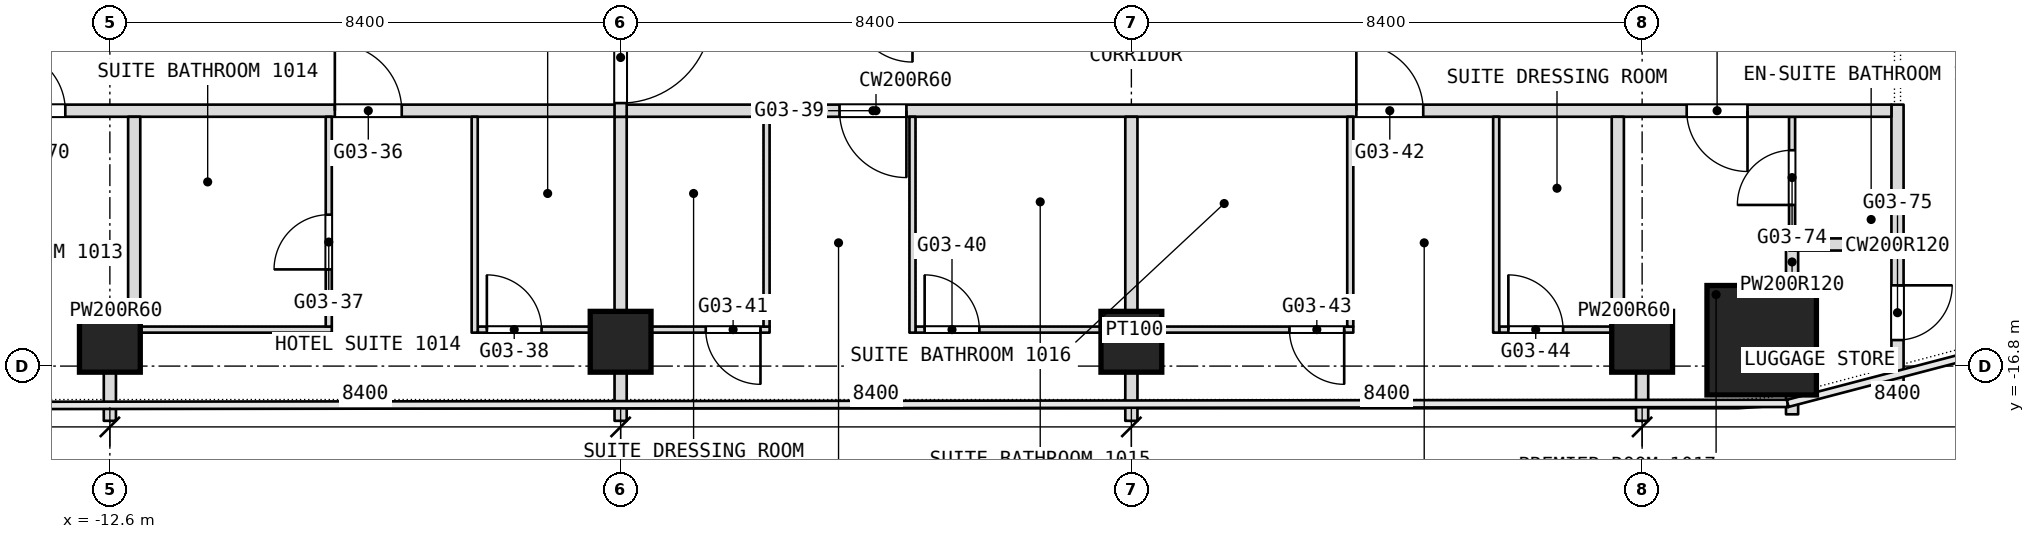
"""IFC4 building model, lengths in metres.
Left out: names, types, materials, properties, quantities, classifications, styles, units other than length and angle.
Written with IfcOpenShell. Run it as: python <this file> out.ifc"""

import sys

from ifc_helpers import new_model, si_unit, direction, frame, frame_2d, origin, origin_2d, place, context, subcontext, project, spatial, rectangle, extrude, element, fill, save


model = new_model("IFC4")
c1 = context("Model", 3, precision=1e-05, world=origin(), true_north=direction((0.0, 1.0)))
c2 = subcontext(c1, "Body", "Model", "MODEL_VIEW")
j1 = project(units=[si_unit("LENGTHUNIT", "METRE"), si_unit("PLANEANGLEUNIT", "RADIAN")], contexts=[c1])
p1 = place(None, origin())
s1 = spatial("IfcSite", under=j1, at=p1, CompositionType="ELEMENT")
p2 = place(p1, origin())
s2 = spatial("IfcBuilding", under=s1, at=p2, CompositionType="ELEMENT")
p3 = place(p2, frame((0.0, 0.0, 50.9)))
s3 = spatial("IfcBuildingStorey", under=s2, at=p3, CompositionType="ELEMENT", Elevation=50.9)
p4 = place(p3, frame((14.566, -16.375, 0.0), z_axis=(0.0, 0.0, 1.0), x_axis=(1.0, 0.0, 0.0)))
e1 = element("IfcColumn", 1, at=p4, inside=s3, PredefinedType="COLUMN", context=c2, shape_type="SweptSolid", body=[
    extrude(rectangle(XDim=1.8, YDim=1.8, at=origin_2d()), origin(), (0.0, 0.0, 1.0), 3.6),
])
for number, where, z_axis, x_axis in (
    (2, (12.6, -16.4, 0.0), (0.0, 0.0, 1.0), (1.0, 0.0, 0.0)),
    (3, (4.2, -16.4, 0.0), (0.0, 0.0, 1.0), (1.0, 0.0, 0.0)),
    (4, (-4.2, -16.4, 0.0), (0.0, 0.0, 1.0), (1.0, 0.0, 0.0)),
    (5, (-12.6, -16.4, 0.0), (0.0, 0.0, 1.0), (1.0, 0.0, 0.0)),
):
    element("IfcColumn", number, at=place(p3, frame(where, z_axis=z_axis, x_axis=x_axis)), inside=s3, PredefinedType="COLUMN", context=c2, shape_type="SweptSolid", body=[
        extrude(rectangle(XDim=1.0, YDim=1.0, at=origin_2d()), origin(), (0.0, 0.0, 1.0), 3.6),
    ])
p5 = place(p3, frame((16.8, -17.143, 0.0), z_axis=(0.0, 0.0, 1.0), x_axis=(0.0, 1.0, 0.0)))
e6 = element("IfcWall", 6, at=p5, inside=s3, PredefinedType="PARTITIONING", context=c2, shape_type="SweptSolid", body=[
    extrude(rectangle(XDim=4.643, YDim=0.2, at=frame_2d((2.322, 0.0))), origin(), (0.0, 0.0, 1.0), 3.34),
])
p6 = place(p5, frame((0.771, 0.0, 0.0)))
e7 = element("IfcOpeningElement", 7, at=p6, cuts=e6, PredefinedType="OPENING", context=c2, shape_type="SweptSolid", body=[
    extrude(rectangle(XDim=0.9, YDim=2.1, at=frame_2d((0.45, 1.05))), frame((0.0, 0.1, 0.0), z_axis=(0.0, -1.0, 0.0), x_axis=(1.0, 0.0, 0.0)), (0.0, 0.0, 1.0), 0.2),
])
p7 = place(p3, frame((-12.5, -16.2, 0.0), z_axis=(0.0, 0.0, 1.0), x_axis=(1.0, 0.0, 0.0)))
e8 = element("IfcWall", 8, at=p7, inside=s3, PredefinedType="PARTITIONING", context=c2, shape_type="SweptSolid", body=[
    extrude(rectangle(XDim=3.55, YDim=0.1, at=frame_2d((1.775, 0.0))), origin(), (0.0, 0.0, 1.0), 2.94),
])
p8 = place(p3, frame((-6.55, -16.2, 0.0), z_axis=(0.0, 0.0, 1.0), x_axis=(1.0, 0.0, 0.0)))
e9 = element("IfcWall", 9, at=p8, inside=s3, PredefinedType="PARTITIONING", context=c2, shape_type="SweptSolid", body=[
    extrude(rectangle(XDim=4.8, YDim=0.1, at=frame_2d((2.4, 0.0))), origin(), (0.0, 0.0, 1.0), 2.94),
])
p9 = place(p8, frame((0.15, 0.0, 0.0)))
e10 = element("IfcOpeningElement", 10, at=p9, cuts=e9, PredefinedType="OPENING", context=c2, shape_type="SweptSolid", body=[
    extrude(rectangle(XDim=0.9, YDim=2.1, at=frame_2d((0.45, 1.05))), frame((0.0, 0.05, 0.0), z_axis=(0.0, -1.0, 0.0), x_axis=(1.0, 0.0, 0.0)), (0.0, 0.0, 1.0), 0.1),
])
p10 = place(p8, frame((3.75, 0.0, 0.0)))
e11 = element("IfcOpeningElement", 11, at=p10, cuts=e9, PredefinedType="OPENING", context=c2, shape_type="SweptSolid", body=[
    extrude(rectangle(XDim=0.9, YDim=2.1, at=frame_2d((0.45, 1.05))), frame((0.0, 0.05, 0.0), z_axis=(0.0, -1.0, 0.0), x_axis=(1.0, 0.0, 0.0)), (0.0, 0.0, 1.0), 0.1),
])
p11 = place(p3, frame((0.65, -16.2, 0.0), z_axis=(0.0, 0.0, 1.0), x_axis=(1.0, 0.0, 0.0)))
e12 = element("IfcWall", 12, at=p11, inside=s3, PredefinedType="PARTITIONING", context=c2, shape_type="SweptSolid", body=[
    extrude(rectangle(XDim=7.2, YDim=0.1, at=frame_2d((3.6, 0.0))), origin(), (0.0, 0.0, 1.0), 2.94),
])
p12 = place(p11, frame((0.15, 0.0, 0.0)))
e13 = element("IfcOpeningElement", 13, at=p12, cuts=e12, PredefinedType="OPENING", context=c2, shape_type="SweptSolid", body=[
    extrude(rectangle(XDim=0.9, YDim=2.1, at=frame_2d((0.45, 1.05))), frame((0.0, 0.05, 0.0), z_axis=(0.0, -1.0, 0.0), x_axis=(1.0, 0.0, 0.0)), (0.0, 0.0, 1.0), 0.1),
])
p13 = place(p11, frame((6.15, 0.0, 0.0)))
e14 = element("IfcOpeningElement", 14, at=p13, cuts=e12, PredefinedType="OPENING", context=c2, shape_type="SweptSolid", body=[
    extrude(rectangle(XDim=0.9, YDim=2.1, at=frame_2d((0.45, 1.05))), frame((0.0, 0.05, 0.0), z_axis=(0.0, -1.0, 0.0), x_axis=(1.0, 0.0, 0.0)), (0.0, 0.0, 1.0), 0.1),
])
p14 = place(p3, frame((10.25, -16.2, 0.0), z_axis=(0.0, 0.0, 1.0), x_axis=(1.0, 0.0, 0.0)))
e15 = element("IfcWall", 15, at=p14, inside=s3, PredefinedType="PARTITIONING", context=c2, shape_type="SweptSolid", body=[
    extrude(rectangle(XDim=2.45, YDim=0.1, at=frame_2d((1.225, 0.0))), origin(), (0.0, 0.0, 1.0), 3.34),
])
p15 = place(p14, frame((0.15, 0.0, 0.0)))
e16 = element("IfcOpeningElement", 16, at=p15, cuts=e15, PredefinedType="OPENING", context=c2, shape_type="SweptSolid", body=[
    extrude(rectangle(XDim=0.9, YDim=2.1, at=frame_2d((0.45, 1.05))), frame((0.0, 0.05, 0.0), z_axis=(0.0, -1.0, 0.0), x_axis=(1.0, 0.0, 0.0)), (0.0, 0.0, 1.0), 0.1),
])
for number, where, z_axis, x_axis in (
    (17, (-12.7, -15.9, 0.0), (0.0, 0.0, 1.0), (1.0, 0.0, 0.0)),
    (18, (12.1, -15.9, 0.0), (0.0, 0.0, 1.0), (1.0, 0.0, 0.0)),
):
    element("IfcWall", number, at=place(p3, frame(where, z_axis=z_axis, x_axis=x_axis)), inside=s3, PredefinedType="PARTITIONING", context=c2, shape_type="SweptSolid", body=[
        extrude(rectangle(XDim=0.4, YDim=0.2, at=frame_2d((0.2, 0.0))), origin(), (0.0, 0.0, 1.0), 3.34),
    ])
p16 = place(p3, frame((15.066, -17.593, 0.0), z_axis=(0.0, 0.0, 1.0), x_axis=(0.0, 1.0, 0.0)))
e19 = element("IfcWall", 19, at=p16, inside=s3, PredefinedType="PARTITIONING", context=c2, shape_type="SweptSolid", body=[
    extrude(rectangle(XDim=0.318, YDim=0.2, at=frame_2d((0.159, 0.0))), origin(), (0.0, 0.0, 1.0), 3.34),
])
p17 = place(p3, frame((15.066, -15.475, 0.0), z_axis=(0.0, 0.0, 1.0), x_axis=(0.0, 1.0, 0.0)))
e20 = element("IfcWall", 20, at=p17, inside=s3, PredefinedType="PARTITIONING", context=c2, shape_type="SweptSolid", body=[
    extrude(rectangle(XDim=0.775, YDim=0.2, at=frame_2d((0.388, 0.0))), origin(), (0.0, 0.0, 1.0), 3.34),
])
p18 = place(p3, frame((15.066, -14.9, 0.0), z_axis=(0.0, 0.0, 1.0), x_axis=(0.0, 1.0, 0.0)))
e21 = element("IfcWall", 21, at=p18, inside=s3, PredefinedType="PARTITIONING", context=c2, shape_type="SweptSolid", body=[
    extrude(rectangle(XDim=2.2, YDim=0.1, at=frame_2d((1.1, 0.0))), origin(), (0.0, 0.0, 1.0), 3.34),
])
p19 = place(p18, frame((0.75, 0.0, 0.0)))
e22 = element("IfcOpeningElement", 22, at=p19, cuts=e21, PredefinedType="OPENING", context=c2, shape_type="SweptSolid", body=[
    extrude(rectangle(XDim=0.9, YDim=2.1, at=frame_2d((0.45, 1.05))), frame((0.0, 0.05, 0.0), z_axis=(0.0, -1.0, 0.0), x_axis=(1.0, 0.0, 0.0)), (0.0, 0.0, 1.0), 0.1),
])
p20 = place(p3, frame((15.116, -14.8, 0.0), z_axis=(0.0, 0.0, 1.0), x_axis=(1.0, 0.0, 0.0)))
e23 = element("IfcWall", 23, at=p20, inside=s3, PredefinedType="PARTITIONING", context=c2, shape_type="SweptSolid", body=[
    extrude(rectangle(XDim=1.584, YDim=0.2, at=frame_2d((0.792, 0.0))), origin(), (0.0, 0.0, 1.0), 3.34),
])
p21 = place(p3, frame((12.6, -17.7, 0.0), z_axis=(0.0, 0.0, 1.0), x_axis=(0.0, 1.0, 0.0)))
e24 = element("IfcWall", 24, at=p21, inside=s3, PredefinedType="PARTITIONING", context=c2, shape_type="SweptSolid", body=[
    extrude(rectangle(XDim=1.9, YDim=0.2, at=frame_2d((0.95, 0.0))), origin(), (0.0, 0.0, 1.0), 3.34),
])
p22 = place(p3, frame((-16.7, -12.6, 0.0), z_axis=(0.0, 0.0, 1.0), x_axis=(1.0, 0.0, 0.0)))
e25 = element("IfcWall", 25, at=p22, inside=s3, PredefinedType="PARTITIONING", context=c2, shape_type="SweptSolid", body=[
    extrude(rectangle(XDim=33.4, YDim=0.2, at=frame_2d((16.7, 0.0))), origin(), (0.0, 0.0, 1.0), 3.34),
])
p23 = place(p22, frame((7.8, 0.0, 0.0)))
e26 = element("IfcOpeningElement", 26, at=p23, cuts=e25, PredefinedType="OPENING", context=c2, shape_type="SweptSolid", body=[
    extrude(rectangle(XDim=1.1, YDim=2.1, at=frame_2d((0.55, 1.05))), frame((0.0, 0.1, 0.0), z_axis=(0.0, -1.0, 0.0), x_axis=(1.0, 0.0, 0.0)), (0.0, 0.0, 1.0), 0.2),
])
p24 = place(p22, frame((16.1, 0.0, 0.0)))
e27 = element("IfcOpeningElement", 27, at=p24, cuts=e25, PredefinedType="OPENING", context=c2, shape_type="SweptSolid", body=[
    extrude(rectangle(XDim=1.1, YDim=2.1, at=frame_2d((0.55, 1.05))), frame((0.0, 0.1, 0.0), z_axis=(0.0, -1.0, 0.0), x_axis=(1.0, 0.0, 0.0)), (0.0, 0.0, 1.0), 0.2),
])
p25 = place(p22, frame((24.6, 0.0, 0.0)))
e28 = element("IfcOpeningElement", 28, at=p25, cuts=e25, PredefinedType="OPENING", context=c2, shape_type="SweptSolid", body=[
    extrude(rectangle(XDim=1.1, YDim=2.1, at=frame_2d((0.55, 1.05))), frame((0.0, 0.1, 0.0), z_axis=(0.0, -1.0, 0.0), x_axis=(1.0, 0.0, 0.0)), (0.0, 0.0, 1.0), 0.2),
])
p26 = place(p22, frame((2.367, 0.0, 0.0)))
e29 = element("IfcOpeningElement", 29, at=p26, cuts=e25, PredefinedType="OPENING", context=c2, shape_type="SweptSolid", body=[
    extrude(rectangle(XDim=1.0, YDim=2.1, at=frame_2d((0.5, 1.05))), frame((0.0, 0.1, 0.0), z_axis=(0.0, -1.0, 0.0), x_axis=(1.0, 0.0, 0.0)), (0.0, 0.0, 1.0), 0.2),
])
p27 = place(p22, frame((30.033, 0.0, 0.0)))
e30 = element("IfcOpeningElement", 30, at=p27, cuts=e25, PredefinedType="OPENING", context=c2, shape_type="SweptSolid", body=[
    extrude(rectangle(XDim=1.0, YDim=2.1, at=frame_2d((0.5, 1.05))), frame((0.0, 0.1, 0.0), z_axis=(0.0, -1.0, 0.0), x_axis=(1.0, 0.0, 0.0)), (0.0, 0.0, 1.0), 0.2),
])
p28 = place(p3, frame((12.2, -15.8, 0.0), z_axis=(0.0, 0.0, 1.0), x_axis=(0.0, 1.0, 0.0)))
e31 = element("IfcWall", 31, at=p28, inside=s3, PredefinedType="PARTITIONING", context=c2, shape_type="SweptSolid", body=[
    extrude(rectangle(XDim=3.1, YDim=0.2, at=frame_2d((1.55, 0.0))), origin(), (0.0, 0.0, 1.0), 3.34),
])
p29 = place(p3, frame((10.2, -16.25, 0.0), z_axis=(0.0, 0.0, 1.0), x_axis=(0.0, 1.0, 0.0)))
e32 = element("IfcWall", 32, at=p29, inside=s3, PredefinedType="PARTITIONING", context=c2, shape_type="SweptSolid", body=[
    extrude(rectangle(XDim=3.55, YDim=0.1, at=frame_2d((1.775, 0.0))), origin(), (0.0, 0.0, 1.0), 3.34),
])
p30 = place(p3, frame((7.8, -16.15, 0.0), z_axis=(0.0, 0.0, 1.0), x_axis=(0.0, 1.0, 0.0)))
e33 = element("IfcWall", 33, at=p30, inside=s3, PredefinedType="PARTITIONING", context=c2, shape_type="SweptSolid", body=[
    extrude(rectangle(XDim=3.45, YDim=0.1, at=frame_2d((1.725, 0.0))), origin(), (0.0, 0.0, 1.0), 3.34),
])
p31 = place(p3, frame((4.2, -17.7, 0.0), z_axis=(0.0, 0.0, 1.0), x_axis=(0.0, 1.0, 0.0)))
e34 = element("IfcWall", 34, at=p31, inside=s3, PredefinedType="PARTITIONING", context=c2, shape_type="SweptSolid", body=[
    extrude(rectangle(XDim=5.0, YDim=0.2, at=frame_2d((2.5, 0.0))), origin(), (0.0, 0.0, 1.0), 3.34),
])
p32 = place(p3, frame((0.6, -16.25, 0.0), z_axis=(0.0, 0.0, 1.0), x_axis=(0.0, 1.0, 0.0)))
e35 = element("IfcWall", 35, at=p32, inside=s3, PredefinedType="PARTITIONING", context=c2, shape_type="SweptSolid", body=[
    extrude(rectangle(XDim=3.55, YDim=0.1, at=frame_2d((1.775, 0.0))), origin(), (0.0, 0.0, 1.0), 3.34),
])
p33 = place(p3, frame((-1.8, -16.15, 0.0), z_axis=(0.0, 0.0, 1.0), x_axis=(0.0, 1.0, 0.0)))
e36 = element("IfcWall", 36, at=p33, inside=s3, PredefinedType="PARTITIONING", context=c2, shape_type="SweptSolid", body=[
    extrude(rectangle(XDim=3.45, YDim=0.1, at=frame_2d((1.725, 0.0))), origin(), (0.0, 0.0, 1.0), 3.34),
])
p34 = place(p3, frame((-4.2, -17.7, 0.0), z_axis=(0.0, 0.0, 1.0), x_axis=(0.0, 1.0, 0.0)))
e37 = element("IfcWall", 37, at=p34, inside=s3, PredefinedType="PARTITIONING", context=c2, shape_type="SweptSolid", body=[
    extrude(rectangle(XDim=5.0, YDim=0.2, at=frame_2d((2.5, 0.0))), origin(), (0.0, 0.0, 1.0), 3.34),
])
p35 = place(p3, frame((-4.2, -12.7, 0.0), z_axis=(0.0, 0.0, 1.0), x_axis=(0.0, 1.0, 0.0)))
e38 = element("IfcWall", 38, at=p35, inside=s3, PredefinedType="PARTITIONING", context=c2, shape_type="SweptSolid", body=[
    extrude(rectangle(XDim=12.7, YDim=0.2, at=frame_2d((6.35, 0.0))), origin(), (0.0, 0.0, 1.0), 3.34),
])
p36 = place(p35, frame((11.05, 0.0, 0.0)))
e39 = element("IfcOpeningElement", 39, at=p36, cuts=e38, PredefinedType="OPENING", context=c2, shape_type="SweptSolid", body=[
    extrude(rectangle(XDim=1.5, YDim=2.1, at=frame_2d((0.75, 1.05))), frame((0.0, 0.1, 0.0), z_axis=(0.0, -1.0, 0.0), x_axis=(1.0, 0.0, 0.0)), (0.0, 0.0, 1.0), 0.2),
])
p37 = place(p35, frame((0.225, 0.0, 0.0)))
e40 = element("IfcOpeningElement", 40, at=p37, cuts=e38, PredefinedType="OPENING", context=c2, shape_type="SweptSolid", body=[
    extrude(rectangle(XDim=1.5, YDim=2.1, at=frame_2d((0.75, 1.05))), frame((0.0, 0.1, 0.0), z_axis=(0.0, -1.0, 0.0), x_axis=(1.0, 0.0, 0.0)), (0.0, 0.0, 1.0), 0.2),
])
p38 = place(p3, frame((-6.6, -16.25, 0.0), z_axis=(0.0, 0.0, 1.0), x_axis=(0.0, 1.0, 0.0)))
e41 = element("IfcWall", 41, at=p38, inside=s3, PredefinedType="PARTITIONING", context=c2, shape_type="SweptSolid", body=[
    extrude(rectangle(XDim=3.55, YDim=0.1, at=frame_2d((1.775, 0.0))), origin(), (0.0, 0.0, 1.0), 3.34),
])
p39 = place(p3, frame((-9.0, -16.15, 0.0), z_axis=(0.0, 0.0, 1.0), x_axis=(0.0, 1.0, 0.0)))
e42 = element("IfcWall", 42, at=p39, inside=s3, PredefinedType="PARTITIONING", context=c2, shape_type="SweptSolid", body=[
    extrude(rectangle(XDim=3.45, YDim=0.1, at=frame_2d((1.725, 0.0))), origin(), (0.0, 0.0, 1.0), 3.34),
])
p40 = place(p39, frame((0.94, 0.0, 0.0)))
e43 = element("IfcOpeningElement", 43, at=p40, cuts=e42, PredefinedType="OPENING", context=c2, shape_type="SweptSolid", body=[
    extrude(rectangle(XDim=0.9, YDim=2.1, at=frame_2d((0.45, 1.05))), frame((0.0, 0.05, 0.0), z_axis=(0.0, -1.0, 0.0), x_axis=(1.0, 0.0, 0.0)), (0.0, 0.0, 1.0), 0.1),
])
p41 = place(p3, frame((-12.2, -16.0, 0.0), z_axis=(0.0, 0.0, 1.0), x_axis=(0.0, 1.0, 0.0)))
e44 = element("IfcWall", 44, at=p41, inside=s3, PredefinedType="PARTITIONING", context=c2, shape_type="SweptSolid", body=[
    extrude(rectangle(XDim=3.3, YDim=0.2, at=frame_2d((1.65, 0.0))), origin(), (0.0, 0.0, 1.0), 3.34),
])
p42 = place(p3, frame((-12.6, -17.7, 0.0), z_axis=(0.0, 0.0, 1.0), x_axis=(0.0, 1.0, 0.0)))
e45 = element("IfcWall", 45, at=p42, inside=s3, PredefinedType="PARTITIONING", context=c2, shape_type="SweptSolid", body=[
    extrude(rectangle(XDim=1.7, YDim=0.2, at=frame_2d((0.85, 0.0))), origin(), (0.0, 0.0, 1.0), 3.34),
])
p43 = place(p6, origin())
e46 = element("IfcDoor", 46, at=p43, inside=s3, OperationType="SINGLE_SWING_RIGHT", PredefinedType="DOOR", context=c2, shape_type="SweptSolid", body=[
    extrude(rectangle(XDim=0.9, YDim=2.1, at=frame_2d((0.45, 1.05))), frame((0.0, 0.025, 0.0), z_axis=(0.0, -1.0, 0.0), x_axis=(1.0, 0.0, 0.0)), (0.0, 0.0, 1.0), 0.05),
])
fill(e7, e46)
p44 = place(p9, origin())
e47 = element("IfcDoor", 47, at=p44, inside=s3, OperationType="SINGLE_SWING_LEFT", PredefinedType="DOOR", context=c2, shape_type="SweptSolid", body=[
    extrude(rectangle(XDim=0.9, YDim=2.1, at=frame_2d((0.45, 1.05))), frame((0.0, 0.025, 0.0), z_axis=(0.0, -1.0, 0.0), x_axis=(1.0, 0.0, 0.0)), (0.0, 0.0, 1.0), 0.05),
])
fill(e10, e47)
p45 = place(p10, origin())
e48 = element("IfcDoor", 48, at=p45, inside=s3, OperationType="SINGLE_SWING_RIGHT", PredefinedType="DOOR", context=c2, shape_type="SweptSolid", body=[
    extrude(rectangle(XDim=0.9, YDim=2.1, at=frame_2d((0.45, 1.05))), frame((0.0, 0.025, 0.0), z_axis=(0.0, -1.0, 0.0), x_axis=(1.0, 0.0, 0.0)), (0.0, 0.0, 1.0), 0.05),
])
fill(e11, e48)
p46 = place(p12, origin())
e49 = element("IfcDoor", 49, at=p46, inside=s3, OperationType="SINGLE_SWING_LEFT", PredefinedType="DOOR", context=c2, shape_type="SweptSolid", body=[
    extrude(rectangle(XDim=0.9, YDim=2.1, at=frame_2d((0.45, 1.05))), frame((0.0, 0.025, 0.0), z_axis=(0.0, -1.0, 0.0), x_axis=(1.0, 0.0, 0.0)), (0.0, 0.0, 1.0), 0.05),
])
fill(e13, e49)
p47 = place(p13, origin())
e50 = element("IfcDoor", 50, at=p47, inside=s3, OperationType="SINGLE_SWING_RIGHT", PredefinedType="DOOR", context=c2, shape_type="SweptSolid", body=[
    extrude(rectangle(XDim=0.9, YDim=2.1, at=frame_2d((0.45, 1.05))), frame((0.0, 0.025, 0.0), z_axis=(0.0, -1.0, 0.0), x_axis=(1.0, 0.0, 0.0)), (0.0, 0.0, 1.0), 0.05),
])
fill(e14, e50)
p48 = place(p15, origin())
e51 = element("IfcDoor", 51, at=p48, inside=s3, OperationType="SINGLE_SWING_LEFT", PredefinedType="DOOR", context=c2, shape_type="SweptSolid", body=[
    extrude(rectangle(XDim=0.9, YDim=2.1, at=frame_2d((0.45, 1.05))), frame((0.0, 0.025, 0.0), z_axis=(0.0, -1.0, 0.0), x_axis=(1.0, 0.0, 0.0)), (0.0, 0.0, 1.0), 0.05),
])
fill(e16, e51)
p49 = place(p19, origin())
e52 = element("IfcDoor", 52, at=p49, inside=s3, OperationType="SINGLE_SWING_RIGHT", PredefinedType="DOOR", context=c2, shape_type="SweptSolid", body=[
    extrude(rectangle(XDim=0.9, YDim=2.1, at=frame_2d((0.45, 1.05))), frame((0.0, 0.025, 0.0), z_axis=(0.0, -1.0, 0.0), x_axis=(1.0, 0.0, 0.0)), (0.0, 0.0, 1.0), 0.05),
])
fill(e22, e52)
p50 = place(p23, origin())
e53 = element("IfcDoor", 53, at=p50, inside=s3, OperationType="SINGLE_SWING_RIGHT", PredefinedType="DOOR", context=c2, shape_type="SweptSolid", body=[
    extrude(rectangle(XDim=1.1, YDim=2.1, at=frame_2d((0.55, 1.05))), frame((0.0, 0.025, 0.0), z_axis=(0.0, -1.0, 0.0), x_axis=(1.0, 0.0, 0.0)), (0.0, 0.0, 1.0), 0.05),
])
fill(e26, e53)
p51 = place(p24, origin())
e54 = element("IfcDoor", 54, at=p51, inside=s3, OperationType="SINGLE_SWING_LEFT", PredefinedType="DOOR", context=c2, shape_type="SweptSolid", body=[
    extrude(rectangle(XDim=1.1, YDim=2.1, at=frame_2d((0.55, 1.05))), frame((0.0, 0.025, 0.0), z_axis=(0.0, -1.0, 0.0), x_axis=(1.0, 0.0, 0.0)), (0.0, 0.0, 1.0), 0.05),
])
fill(e27, e54)
p52 = place(p25, origin())
e55 = element("IfcDoor", 55, at=p52, inside=s3, OperationType="SINGLE_SWING_RIGHT", PredefinedType="DOOR", context=c2, shape_type="SweptSolid", body=[
    extrude(rectangle(XDim=1.1, YDim=2.1, at=frame_2d((0.55, 1.05))), frame((0.0, 0.025, 0.0), z_axis=(0.0, -1.0, 0.0), x_axis=(1.0, 0.0, 0.0)), (0.0, 0.0, 1.0), 0.05),
])
fill(e28, e55)
p53 = place(p26, origin())
e56 = element("IfcDoor", 56, at=p53, inside=s3, OperationType="SINGLE_SWING_RIGHT", PredefinedType="DOOR", context=c2, shape_type="SweptSolid", body=[
    extrude(rectangle(XDim=1.0, YDim=2.1, at=frame_2d((0.5, 1.05))), frame((0.0, 0.025, 0.0), z_axis=(0.0, -1.0, 0.0), x_axis=(1.0, 0.0, 0.0)), (0.0, 0.0, 1.0), 0.05),
])
fill(e29, e56)
p54 = place(p27, origin())
e57 = element("IfcDoor", 57, at=p54, inside=s3, OperationType="SINGLE_SWING_LEFT", PredefinedType="DOOR", context=c2, shape_type="SweptSolid", body=[
    extrude(rectangle(XDim=1.0, YDim=2.1, at=frame_2d((0.5, 1.05))), frame((0.0, 0.025, 0.0), z_axis=(0.0, -1.0, 0.0), x_axis=(1.0, 0.0, 0.0)), (0.0, 0.0, 1.0), 0.05),
])
fill(e30, e57)
p55 = place(p40, origin())
e58 = element("IfcDoor", 58, at=p55, inside=s3, OperationType="SINGLE_SWING_LEFT", PredefinedType="DOOR", context=c2, shape_type="SweptSolid", body=[
    extrude(rectangle(XDim=0.9, YDim=2.1, at=frame_2d((0.45, 1.05))), frame((0.0, 0.025, 0.0), z_axis=(0.0, -1.0, 0.0), x_axis=(1.0, 0.0, 0.0)), (0.0, 0.0, 1.0), 0.05),
])
fill(e43, e58)
p56 = place(p37, origin())
e59 = element("IfcDoor", 59, at=p56, inside=s3, OperationType="DOUBLE_DOOR_DOUBLE_SWING", PredefinedType="DOOR", context=c2, shape_type="SweptSolid", body=[
    extrude(rectangle(XDim=1.5, YDim=2.1, at=frame_2d((0.75, 1.05))), frame((0.0, 0.025, 0.0), z_axis=(0.0, -1.0, 0.0), x_axis=(1.0, 0.0, 0.0)), (0.0, 0.0, 1.0), 0.05),
])
fill(e40, e59)
save(model, sys.argv[1])
